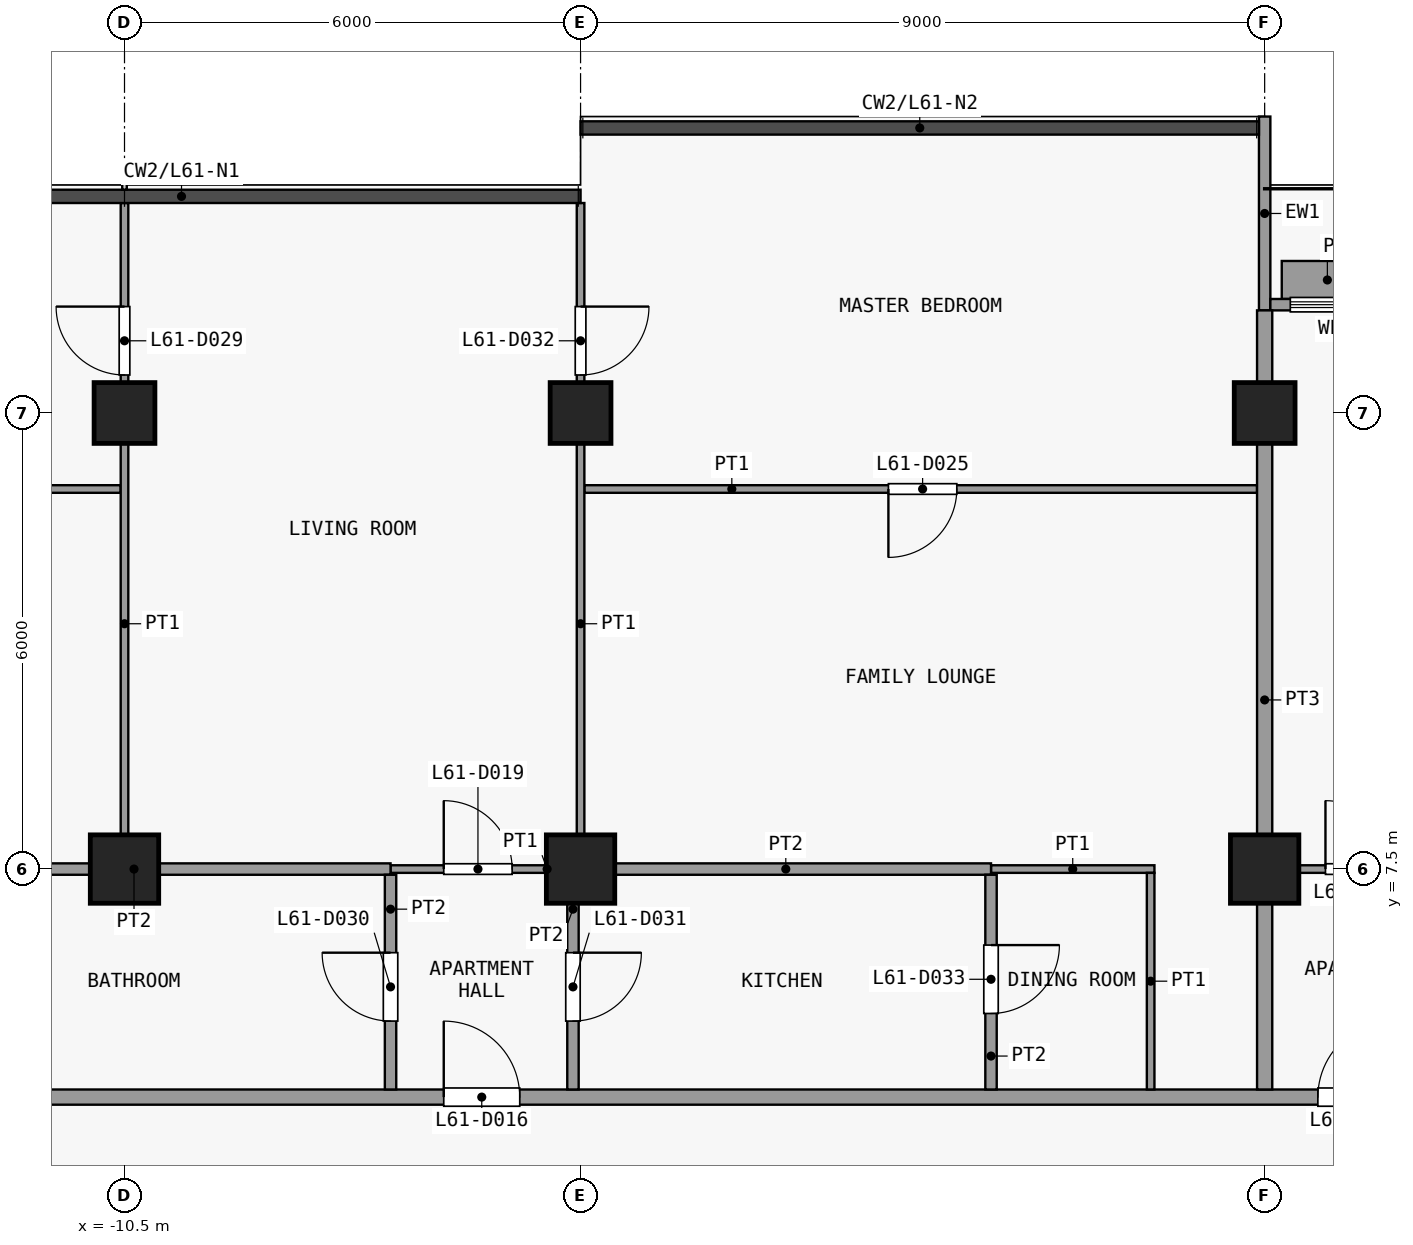
"""IFC4 building model, lengths in metres.
Left out: names, types, materials, properties, quantities, classifications, styles, units other than length and angle.
Written with IfcOpenShell. Run it as: python <this file> out.ifc"""

import sys

from ifc_helpers import new_model, si_unit, direction, frame, frame_2d, origin, origin_2d, place, context, subcontext, project, spatial, rectangle, extrude, element, fill, save


model = new_model("IFC4")
c1 = context("Model", 3, precision=1e-05, world=origin(), true_north=direction((0.0, 1.0)))
c2 = subcontext(c1, "Body", "Model", "MODEL_VIEW")
j1 = project(units=[si_unit("LENGTHUNIT", "METRE"), si_unit("PLANEANGLEUNIT", "RADIAN")], contexts=[c1])
p1 = place(None, origin())
s1 = spatial("IfcSite", under=j1, at=p1, CompositionType="ELEMENT")
p2 = place(p1, origin())
s2 = spatial("IfcBuilding", under=s1, at=p2, CompositionType="ELEMENT")
p3 = place(p2, frame((0.0, 0.0, 241.1)))
s3 = spatial("IfcBuildingStorey", under=s2, at=p3, CompositionType="ELEMENT", Elevation=241.1)
p4 = place(p3, frame((-10.5, 7.5, 0.0), z_axis=(0.0, 0.0, 1.0), x_axis=(1.0, 0.0, 0.0)))
e1 = element("IfcColumn", 1, at=p4, inside=s3, PredefinedType="COLUMN", context=c2, shape_type="SweptSolid", body=[
    extrude(rectangle(XDim=0.9, YDim=0.9, at=origin_2d()), origin(), (0.0, 0.0, 1.0), 3.6),
])
p5 = place(p3, frame((-10.5, 13.5, 0.0), z_axis=(0.0, 0.0, 1.0), x_axis=(1.0, 0.0, 0.0)))
e2 = element("IfcColumn", 2, at=p5, inside=s3, PredefinedType="COLUMN", context=c2, shape_type="SweptSolid", body=[
    extrude(rectangle(XDim=0.8, YDim=0.8, at=origin_2d()), origin(), (0.0, 0.0, 1.0), 3.6),
])
p6 = place(p3, frame((-4.5, 7.5, 0.0), z_axis=(0.0, 0.0, 1.0), x_axis=(1.0, 0.0, 0.0)))
e3 = element("IfcColumn", 3, at=p6, inside=s3, PredefinedType="COLUMN", context=c2, shape_type="SweptSolid", body=[
    extrude(rectangle(XDim=0.9, YDim=0.9, at=origin_2d()), origin(), (0.0, 0.0, 1.0), 3.6),
])
p7 = place(p3, frame((-4.5, 13.5, 0.0), z_axis=(0.0, 0.0, 1.0), x_axis=(1.0, 0.0, 0.0)))
e4 = element("IfcColumn", 4, at=p7, inside=s3, PredefinedType="COLUMN", context=c2, shape_type="SweptSolid", body=[
    extrude(rectangle(XDim=0.8, YDim=0.8, at=origin_2d()), origin(), (0.0, 0.0, 1.0), 3.6),
])
p8 = place(p3, frame((4.5, 7.5, 0.0), z_axis=(0.0, 0.0, 1.0), x_axis=(1.0, 0.0, 0.0)))
e5 = element("IfcColumn", 5, at=p8, inside=s3, PredefinedType="COLUMN", context=c2, shape_type="SweptSolid", body=[
    extrude(rectangle(XDim=0.9, YDim=0.9, at=origin_2d()), origin(), (0.0, 0.0, 1.0), 3.6),
])
p9 = place(p3, frame((4.5, 13.5, 0.0), z_axis=(0.0, 0.0, 1.0), x_axis=(1.0, 0.0, 0.0)))
e6 = element("IfcColumn", 6, at=p9, inside=s3, PredefinedType="COLUMN", context=c2, shape_type="SweptSolid", body=[
    extrude(rectangle(XDim=0.8, YDim=0.8, at=origin_2d()), origin(), (0.0, 0.0, 1.0), 3.6),
])
p10 = place(p3, frame((4.5, 14.85, 0.0), z_axis=(0.0, 0.0, 1.0), x_axis=(0.0, 1.0, 0.0)))
e7 = element("IfcWall", 7, at=p10, inside=s3, PredefinedType="SOLIDWALL", context=c2, shape_type="SweptSolid", body=[
    extrude(rectangle(XDim=2.55, YDim=0.15, at=frame_2d((1.275, 0.0))), origin(), (0.0, 0.0, 1.0), 3.3),
])
p11 = place(p3, frame((4.575, 14.925, 0.0), z_axis=(0.0, 0.0, 1.0), x_axis=(1.0, 0.0, 0.0)))
e8 = element("IfcWall", 8, at=p11, inside=s3, PredefinedType="SOLIDWALL", context=c2, shape_type="SweptSolid", body=[
    extrude(rectangle(XDim=5.85, YDim=0.15, at=frame_2d((2.925, 0.0))), origin(), (0.0, 0.0, 1.0), 3.3),
])
p12 = place(p11, frame((2.325, 0.0, 0.0)))
e9 = element("IfcOpeningElement", 9, at=p12, cuts=e8, PredefinedType="OPENING", context=c2, shape_type="SweptSolid", body=[
    extrude(rectangle(XDim=1.2, YDim=2.4, at=frame_2d((0.6, 1.2))), frame((0.0, 0.085, 0.0), z_axis=(0.0, -1.0, 0.0), x_axis=(1.0, 0.0, 0.0)), (0.0, 0.0, 1.0), 0.17),
])
p13 = place(p11, frame((0.262, 0.0, 0.9)))
e10 = element("IfcOpeningElement", 10, at=p13, cuts=e8, PredefinedType="OPENING", context=c2, shape_type="SweptSolid", body=[
    extrude(rectangle(XDim=1.8, YDim=2.1, at=frame_2d((0.9, 1.05))), frame((0.0, 0.085, 0.0), z_axis=(0.0, -1.0, 0.0), x_axis=(1.0, 0.0, 0.0)), (0.0, 0.0, 1.0), 0.17),
])
p14 = place(p11, frame((3.788, 0.0, 0.9)))
e11 = element("IfcOpeningElement", 11, at=p14, cuts=e8, PredefinedType="OPENING", context=c2, shape_type="SweptSolid", body=[
    extrude(rectangle(XDim=1.8, YDim=2.1, at=frame_2d((0.9, 1.05))), frame((0.0, 0.085, 0.0), z_axis=(0.0, -1.0, 0.0), x_axis=(1.0, 0.0, 0.0)), (0.0, 0.0, 1.0), 0.17),
])
p15 = place(p3, frame((4.725, 15.25, 0.0), z_axis=(0.0, 0.0, 1.0), x_axis=(1.0, 0.0, 0.0)))
e12 = element("IfcWall", 12, at=p15, inside=s3, PredefinedType="USERDEFINED", context=c2, shape_type="SweptSolid", body=[
    extrude(rectangle(XDim=1.2, YDim=0.5, at=frame_2d((0.6, 0.0))), origin(), (0.0, 0.0, 1.0), 0.9),
])
p16 = place(p3, frame((-19.35, 4.5, 0.0), z_axis=(0.0, 0.0, 1.0), x_axis=(1.0, 0.0, 0.0)))
e13 = element("IfcWall", 13, at=p16, inside=s3, PredefinedType="PARTITIONING", context=c2, shape_type="SweptSolid", body=[
    extrude(rectangle(XDim=38.7, YDim=0.2, at=frame_2d((19.35, 0.0))), origin(), (0.0, 0.0, 1.0), 3.3),
])
p17 = place(p16, frame((13.05, 0.0, 0.0)))
e14 = element("IfcOpeningElement", 14, at=p17, cuts=e13, PredefinedType="OPENING", context=c2, shape_type="SweptSolid", body=[
    extrude(rectangle(XDim=1.0, YDim=2.1, at=frame_2d((0.5, 1.05))), frame((0.0, 0.11, 0.0), z_axis=(0.0, -1.0, 0.0), x_axis=(1.0, 0.0, 0.0)), (0.0, 0.0, 1.0), 0.22),
])
p18 = place(p16, frame((24.55, 0.0, 0.0)))
e15 = element("IfcOpeningElement", 15, at=p18, cuts=e13, PredefinedType="OPENING", context=c2, shape_type="SweptSolid", body=[
    extrude(rectangle(XDim=1.0, YDim=2.1, at=frame_2d((0.5, 1.05))), frame((0.0, 0.11, 0.0), z_axis=(0.0, -1.0, 0.0), x_axis=(1.0, 0.0, 0.0)), (0.0, 0.0, 1.0), 0.22),
])
p19 = place(p16, frame((33.05, 0.0, 0.0)))
e16 = element("IfcOpeningElement", 16, at=p19, cuts=e13, PredefinedType="OPENING", context=c2, shape_type="SweptSolid", body=[
    extrude(rectangle(XDim=1.0, YDim=2.1, at=frame_2d((0.5, 1.05))), frame((0.0, 0.11, 0.0), z_axis=(0.0, -1.0, 0.0), x_axis=(1.0, 0.0, 0.0)), (0.0, 0.0, 1.0), 0.22),
])
p20 = place(p3, frame((-7.0, 7.5, 0.0), z_axis=(0.0, 0.0, 1.0), x_axis=(1.0, 0.0, 0.0)))
e17 = element("IfcWall", 17, at=p20, inside=s3, PredefinedType="PARTITIONING", context=c2, shape_type="SweptSolid", body=[
    extrude(rectangle(XDim=2.4, YDim=0.1, at=frame_2d((1.2, 0.0))), origin(), (0.0, 0.0, 1.0), 3.3),
])
p21 = place(p20, frame((0.7, 0.0, 0.0)))
e18 = element("IfcOpeningElement", 18, at=p21, cuts=e17, PredefinedType="OPENING", context=c2, shape_type="SweptSolid", body=[
    extrude(rectangle(XDim=0.9, YDim=2.1, at=frame_2d((0.45, 1.05))), frame((0.0, 0.06, 0.0), z_axis=(0.0, -1.0, 0.0), x_axis=(1.0, 0.0, 0.0)), (0.0, 0.0, 1.0), 0.12),
])
p22 = place(p3, frame((0.9, 7.5, 0.0), z_axis=(0.0, 0.0, 1.0), x_axis=(1.0, 0.0, 0.0)))
e19 = element("IfcWall", 19, at=p22, inside=s3, PredefinedType="PARTITIONING", context=c2, shape_type="SweptSolid", body=[
    extrude(rectangle(XDim=2.15, YDim=0.1, at=frame_2d((1.075, 0.0))), origin(), (0.0, 0.0, 1.0), 3.3),
])
p23 = place(p3, frame((4.6, 7.5, 0.0), z_axis=(0.0, 0.0, 1.0), x_axis=(1.0, 0.0, 0.0)))
e20 = element("IfcWall", 20, at=p23, inside=s3, PredefinedType="PARTITIONING", context=c2, shape_type="SweptSolid", body=[
    extrude(rectangle(XDim=2.3, YDim=0.1, at=frame_2d((1.15, 0.0))), origin(), (0.0, 0.0, 1.0), 3.3),
])
p24 = place(p23, frame((0.7, 0.0, 0.0)))
e21 = element("IfcOpeningElement", 21, at=p24, cuts=e20, PredefinedType="OPENING", context=c2, shape_type="SweptSolid", body=[
    extrude(rectangle(XDim=0.9, YDim=2.1, at=frame_2d((0.45, 1.05))), frame((0.0, 0.06, 0.0), z_axis=(0.0, -1.0, 0.0), x_axis=(1.0, 0.0, 0.0)), (0.0, 0.0, 1.0), 0.12),
])
p25 = place(p3, frame((-13.75, 7.5, 0.0), z_axis=(0.0, 0.0, 1.0), x_axis=(1.0, 0.0, 0.0)))
e22 = element("IfcWall", 22, at=p25, inside=s3, PredefinedType="PARTITIONING", context=c2, shape_type="SweptSolid", body=[
    extrude(rectangle(XDim=6.75, YDim=0.15, at=frame_2d((3.375, 0.0))), origin(), (0.0, 0.0, 1.0), 3.3),
])
p26 = place(p3, frame((-4.5, 7.5, 0.0), z_axis=(0.0, 0.0, 1.0), x_axis=(1.0, 0.0, 0.0)))
e23 = element("IfcWall", 23, at=p26, inside=s3, PredefinedType="PARTITIONING", context=c2, shape_type="SweptSolid", body=[
    extrude(rectangle(XDim=5.4, YDim=0.15, at=frame_2d((2.7, 0.0))), origin(), (0.0, 0.0, 1.0), 3.3),
])
p27 = place(p3, frame((-14.85, 12.5, 0.0), z_axis=(0.0, 0.0, 1.0), x_axis=(1.0, 0.0, 0.0)))
e24 = element("IfcWall", 24, at=p27, inside=s3, PredefinedType="PARTITIONING", context=c2, shape_type="SweptSolid", body=[
    extrude(rectangle(XDim=4.3, YDim=0.1, at=frame_2d((2.15, 0.0))), origin(), (0.0, 0.0, 1.0), 3.3),
])
p28 = place(p27, frame((1.7, 0.0, 0.0)))
e25 = element("IfcOpeningElement", 25, at=p28, cuts=e24, PredefinedType="OPENING", context=c2, shape_type="SweptSolid", body=[
    extrude(rectangle(XDim=0.9, YDim=2.1, at=frame_2d((0.45, 1.05))), frame((0.0, 0.06, 0.0), z_axis=(0.0, -1.0, 0.0), x_axis=(1.0, 0.0, 0.0)), (0.0, 0.0, 1.0), 0.12),
])
p29 = place(p3, frame((-4.45, 12.5, 0.0), z_axis=(0.0, 0.0, 1.0), x_axis=(1.0, 0.0, 0.0)))
e26 = element("IfcWall", 26, at=p29, inside=s3, PredefinedType="PARTITIONING", context=c2, shape_type="SweptSolid", body=[
    extrude(rectangle(XDim=8.85, YDim=0.1, at=frame_2d((4.425, 0.0))), origin(), (0.0, 0.0, 1.0), 3.3),
])
p30 = place(p29, frame((4.0, 0.0, 0.0)))
e27 = element("IfcOpeningElement", 27, at=p30, cuts=e26, PredefinedType="OPENING", context=c2, shape_type="SweptSolid", body=[
    extrude(rectangle(XDim=0.9, YDim=2.1, at=frame_2d((0.45, 1.05))), frame((0.0, 0.06, 0.0), z_axis=(0.0, -1.0, 0.0), x_axis=(1.0, 0.0, 0.0)), (0.0, 0.0, 1.0), 0.12),
])
p31 = place(p3, frame((-10.5, 7.575, 0.0), z_axis=(0.0, 0.0, 1.0), x_axis=(0.0, 1.0, 0.0)))
e28 = element("IfcWall", 28, at=p31, inside=s3, PredefinedType="PARTITIONING", context=c2, shape_type="SweptSolid", body=[
    extrude(rectangle(XDim=8.688, YDim=0.1, at=frame_2d((4.344, 0.0))), origin(), (0.0, 0.0, 1.0), 3.3),
])
p32 = place(p31, frame((6.425, 0.0, 0.0)))
e29 = element("IfcOpeningElement", 29, at=p32, cuts=e28, PredefinedType="OPENING", context=c2, shape_type="SweptSolid", body=[
    extrude(rectangle(XDim=0.9, YDim=2.1, at=frame_2d((0.45, 1.05))), frame((0.0, 0.06, 0.0), z_axis=(0.0, -1.0, 0.0), x_axis=(1.0, 0.0, 0.0)), (0.0, 0.0, 1.0), 0.12),
])
p33 = place(p3, frame((-7.0, 4.6, 0.0), z_axis=(0.0, 0.0, 1.0), x_axis=(0.0, 1.0, 0.0)))
e30 = element("IfcWall", 30, at=p33, inside=s3, PredefinedType="PARTITIONING", context=c2, shape_type="SweptSolid", body=[
    extrude(rectangle(XDim=2.825, YDim=0.15, at=frame_2d((1.413, 0.0))), origin(), (0.0, 0.0, 1.0), 3.3),
])
p34 = place(p33, frame((0.9, 0.0, 0.0)))
e31 = element("IfcOpeningElement", 31, at=p34, cuts=e30, PredefinedType="OPENING", context=c2, shape_type="SweptSolid", body=[
    extrude(rectangle(XDim=0.9, YDim=2.1, at=frame_2d((0.45, 1.05))), frame((0.0, 0.085, 0.0), z_axis=(0.0, -1.0, 0.0), x_axis=(1.0, 0.0, 0.0)), (0.0, 0.0, 1.0), 0.17),
])
p35 = place(p3, frame((-4.6, 4.6, 0.0), z_axis=(0.0, 0.0, 1.0), x_axis=(0.0, 1.0, 0.0)))
e32 = element("IfcWall", 32, at=p35, inside=s3, PredefinedType="PARTITIONING", context=c2, shape_type="SweptSolid", body=[
    extrude(rectangle(XDim=2.825, YDim=0.15, at=frame_2d((1.413, 0.0))), origin(), (0.0, 0.0, 1.0), 3.3),
])
p36 = place(p35, frame((0.9, 0.0, 0.0)))
e33 = element("IfcOpeningElement", 33, at=p36, cuts=e32, PredefinedType="OPENING", context=c2, shape_type="SweptSolid", body=[
    extrude(rectangle(XDim=0.9, YDim=2.1, at=frame_2d((0.45, 1.05))), frame((0.0, 0.085, 0.0), z_axis=(0.0, -1.0, 0.0), x_axis=(1.0, 0.0, 0.0)), (0.0, 0.0, 1.0), 0.17),
])
p37 = place(p3, frame((-4.5, 7.575, 0.0), z_axis=(0.0, 0.0, 1.0), x_axis=(0.0, 1.0, 0.0)))
e34 = element("IfcWall", 34, at=p37, inside=s3, PredefinedType="PARTITIONING", context=c2, shape_type="SweptSolid", body=[
    extrude(rectangle(XDim=8.688, YDim=0.1, at=frame_2d((4.344, 0.0))), origin(), (0.0, 0.0, 1.0), 3.3),
])
p38 = place(p37, frame((6.425, 0.0, 0.0)))
e35 = element("IfcOpeningElement", 35, at=p38, cuts=e34, PredefinedType="OPENING", context=c2, shape_type="SweptSolid", body=[
    extrude(rectangle(XDim=0.9, YDim=2.1, at=frame_2d((0.45, 1.05))), frame((0.0, 0.06, 0.0), z_axis=(0.0, -1.0, 0.0), x_axis=(1.0, 0.0, 0.0)), (0.0, 0.0, 1.0), 0.12),
])
p39 = place(p3, frame((0.9, 4.6, 0.0), z_axis=(0.0, 0.0, 1.0), x_axis=(0.0, 1.0, 0.0)))
e36 = element("IfcWall", 36, at=p39, inside=s3, PredefinedType="PARTITIONING", context=c2, shape_type="SweptSolid", body=[
    extrude(rectangle(XDim=2.825, YDim=0.15, at=frame_2d((1.413, 0.0))), origin(), (0.0, 0.0, 1.0), 3.3),
])
p40 = place(p39, frame((1.0, 0.0, 0.0)))
e37 = element("IfcOpeningElement", 37, at=p40, cuts=e36, PredefinedType="OPENING", context=c2, shape_type="SweptSolid", body=[
    extrude(rectangle(XDim=0.9, YDim=2.1, at=frame_2d((0.45, 1.05))), frame((0.0, 0.085, 0.0), z_axis=(0.0, -1.0, 0.0), x_axis=(1.0, 0.0, 0.0)), (0.0, 0.0, 1.0), 0.17),
])
p41 = place(p3, frame((3.0, 4.6, 0.0), z_axis=(0.0, 0.0, 1.0), x_axis=(0.0, 1.0, 0.0)))
e38 = element("IfcWall", 38, at=p41, inside=s3, PredefinedType="PARTITIONING", context=c2, shape_type="SweptSolid", body=[
    extrude(rectangle(XDim=2.85, YDim=0.1, at=frame_2d((1.425, 0.0))), origin(), (0.0, 0.0, 1.0), 3.3),
])
p42 = place(p3, frame((4.5, 4.6, 0.0), z_axis=(0.0, 0.0, 1.0), x_axis=(0.0, 1.0, 0.0)))
e39 = element("IfcWall", 39, at=p42, inside=s3, PredefinedType="PARTITIONING", context=c2, shape_type="SweptSolid", body=[
    extrude(rectangle(XDim=10.25, YDim=0.2, at=frame_2d((5.125, 0.0))), origin(), (0.0, 0.0, 1.0), 3.3),
])
p43 = place(p13, origin())
e40 = element("IfcWindow", 40, at=p43, inside=s3, PartitioningType="SINGLE_PANEL", PredefinedType="WINDOW", context=c2, shape_type="SweptSolid", body=[
    extrude(rectangle(XDim=1.8, YDim=2.1, at=frame_2d((0.9, 1.05))), frame((0.0, 0.03, 0.0), z_axis=(0.0, -1.0, 0.0), x_axis=(1.0, 0.0, 0.0)), (0.0, 0.0, 1.0), 0.06),
])
fill(e10, e40)
p44 = place(p17, origin())
e41 = element("IfcDoor", 41, at=p44, inside=s3, OperationType="SINGLE_SWING_RIGHT", PredefinedType="DOOR", context=c2, shape_type="SweptSolid", body=[
    extrude(rectangle(XDim=1.0, YDim=2.1, at=frame_2d((0.5, 1.05))), frame((0.0, 0.025, 0.0), z_axis=(0.0, -1.0, 0.0), x_axis=(1.0, 0.0, 0.0)), (0.0, 0.0, 1.0), 0.05),
])
fill(e14, e41)
p45 = place(p18, origin())
e42 = element("IfcDoor", 42, at=p45, inside=s3, OperationType="SINGLE_SWING_LEFT", PredefinedType="DOOR", context=c2, shape_type="SweptSolid", body=[
    extrude(rectangle(XDim=1.0, YDim=2.1, at=frame_2d((0.5, 1.05))), frame((0.0, 0.025, 0.0), z_axis=(0.0, -1.0, 0.0), x_axis=(1.0, 0.0, 0.0)), (0.0, 0.0, 1.0), 0.05),
])
fill(e15, e42)
p46 = place(p21, origin())
e43 = element("IfcDoor", 43, at=p46, inside=s3, OperationType="SINGLE_SWING_RIGHT", PredefinedType="DOOR", context=c2, shape_type="SweptSolid", body=[
    extrude(rectangle(XDim=0.9, YDim=2.1, at=frame_2d((0.45, 1.05))), frame((0.0, 0.025, 0.0), z_axis=(0.0, -1.0, 0.0), x_axis=(1.0, 0.0, 0.0)), (0.0, 0.0, 1.0), 0.05),
])
fill(e18, e43)
p47 = place(p24, origin())
e44 = element("IfcDoor", 44, at=p47, inside=s3, OperationType="SINGLE_SWING_RIGHT", PredefinedType="DOOR", context=c2, shape_type="SweptSolid", body=[
    extrude(rectangle(XDim=0.9, YDim=2.1, at=frame_2d((0.45, 1.05))), frame((0.0, 0.025, 0.0), z_axis=(0.0, -1.0, 0.0), x_axis=(1.0, 0.0, 0.0)), (0.0, 0.0, 1.0), 0.05),
])
fill(e21, e44)
p48 = place(p30, origin())
e45 = element("IfcDoor", 45, at=p48, inside=s3, OperationType="SINGLE_SWING_LEFT", PredefinedType="DOOR", context=c2, shape_type="SweptSolid", body=[
    extrude(rectangle(XDim=0.9, YDim=2.1, at=frame_2d((0.45, 1.05))), frame((0.0, 0.025, 0.0), z_axis=(0.0, -1.0, 0.0), x_axis=(1.0, 0.0, 0.0)), (0.0, 0.0, 1.0), 0.05),
])
fill(e27, e45)
p49 = place(p32, origin())
e46 = element("IfcDoor", 46, at=p49, inside=s3, OperationType="SINGLE_SWING_LEFT", PredefinedType="DOOR", context=c2, shape_type="SweptSolid", body=[
    extrude(rectangle(XDim=0.9, YDim=2.1, at=frame_2d((0.45, 1.05))), frame((0.0, 0.025, 0.0), z_axis=(0.0, -1.0, 0.0), x_axis=(1.0, 0.0, 0.0)), (0.0, 0.0, 1.0), 0.05),
])
fill(e29, e46)
p50 = place(p34, origin())
e47 = element("IfcDoor", 47, at=p50, inside=s3, OperationType="SINGLE_SWING_LEFT", PredefinedType="DOOR", context=c2, shape_type="SweptSolid", body=[
    extrude(rectangle(XDim=0.9, YDim=2.1, at=frame_2d((0.45, 1.05))), frame((0.0, 0.025, 0.0), z_axis=(0.0, -1.0, 0.0), x_axis=(1.0, 0.0, 0.0)), (0.0, 0.0, 1.0), 0.05),
])
fill(e31, e47)
p51 = place(p36, origin())
e48 = element("IfcDoor", 48, at=p51, inside=s3, OperationType="SINGLE_SWING_RIGHT", PredefinedType="DOOR", context=c2, shape_type="SweptSolid", body=[
    extrude(rectangle(XDim=0.9, YDim=2.1, at=frame_2d((0.45, 1.05))), frame((0.0, 0.025, 0.0), z_axis=(0.0, -1.0, 0.0), x_axis=(1.0, 0.0, 0.0)), (0.0, 0.0, 1.0), 0.05),
])
fill(e33, e48)
p52 = place(p38, origin())
e49 = element("IfcDoor", 49, at=p52, inside=s3, OperationType="SINGLE_SWING_RIGHT", PredefinedType="DOOR", context=c2, shape_type="SweptSolid", body=[
    extrude(rectangle(XDim=0.9, YDim=2.1, at=frame_2d((0.45, 1.05))), frame((0.0, 0.025, 0.0), z_axis=(0.0, -1.0, 0.0), x_axis=(1.0, 0.0, 0.0)), (0.0, 0.0, 1.0), 0.05),
])
fill(e35, e49)
p53 = place(p40, origin())
e50 = element("IfcDoor", 50, at=p53, inside=s3, OperationType="SINGLE_SWING_RIGHT", PredefinedType="DOOR", context=c2, shape_type="SweptSolid", body=[
    extrude(rectangle(XDim=0.9, YDim=2.1, at=frame_2d((0.45, 1.05))), frame((0.0, 0.025, 0.0), z_axis=(0.0, -1.0, 0.0), x_axis=(1.0, 0.0, 0.0)), (0.0, 0.0, 1.0), 0.05),
])
fill(e37, e50)
save(model, sys.argv[1])
